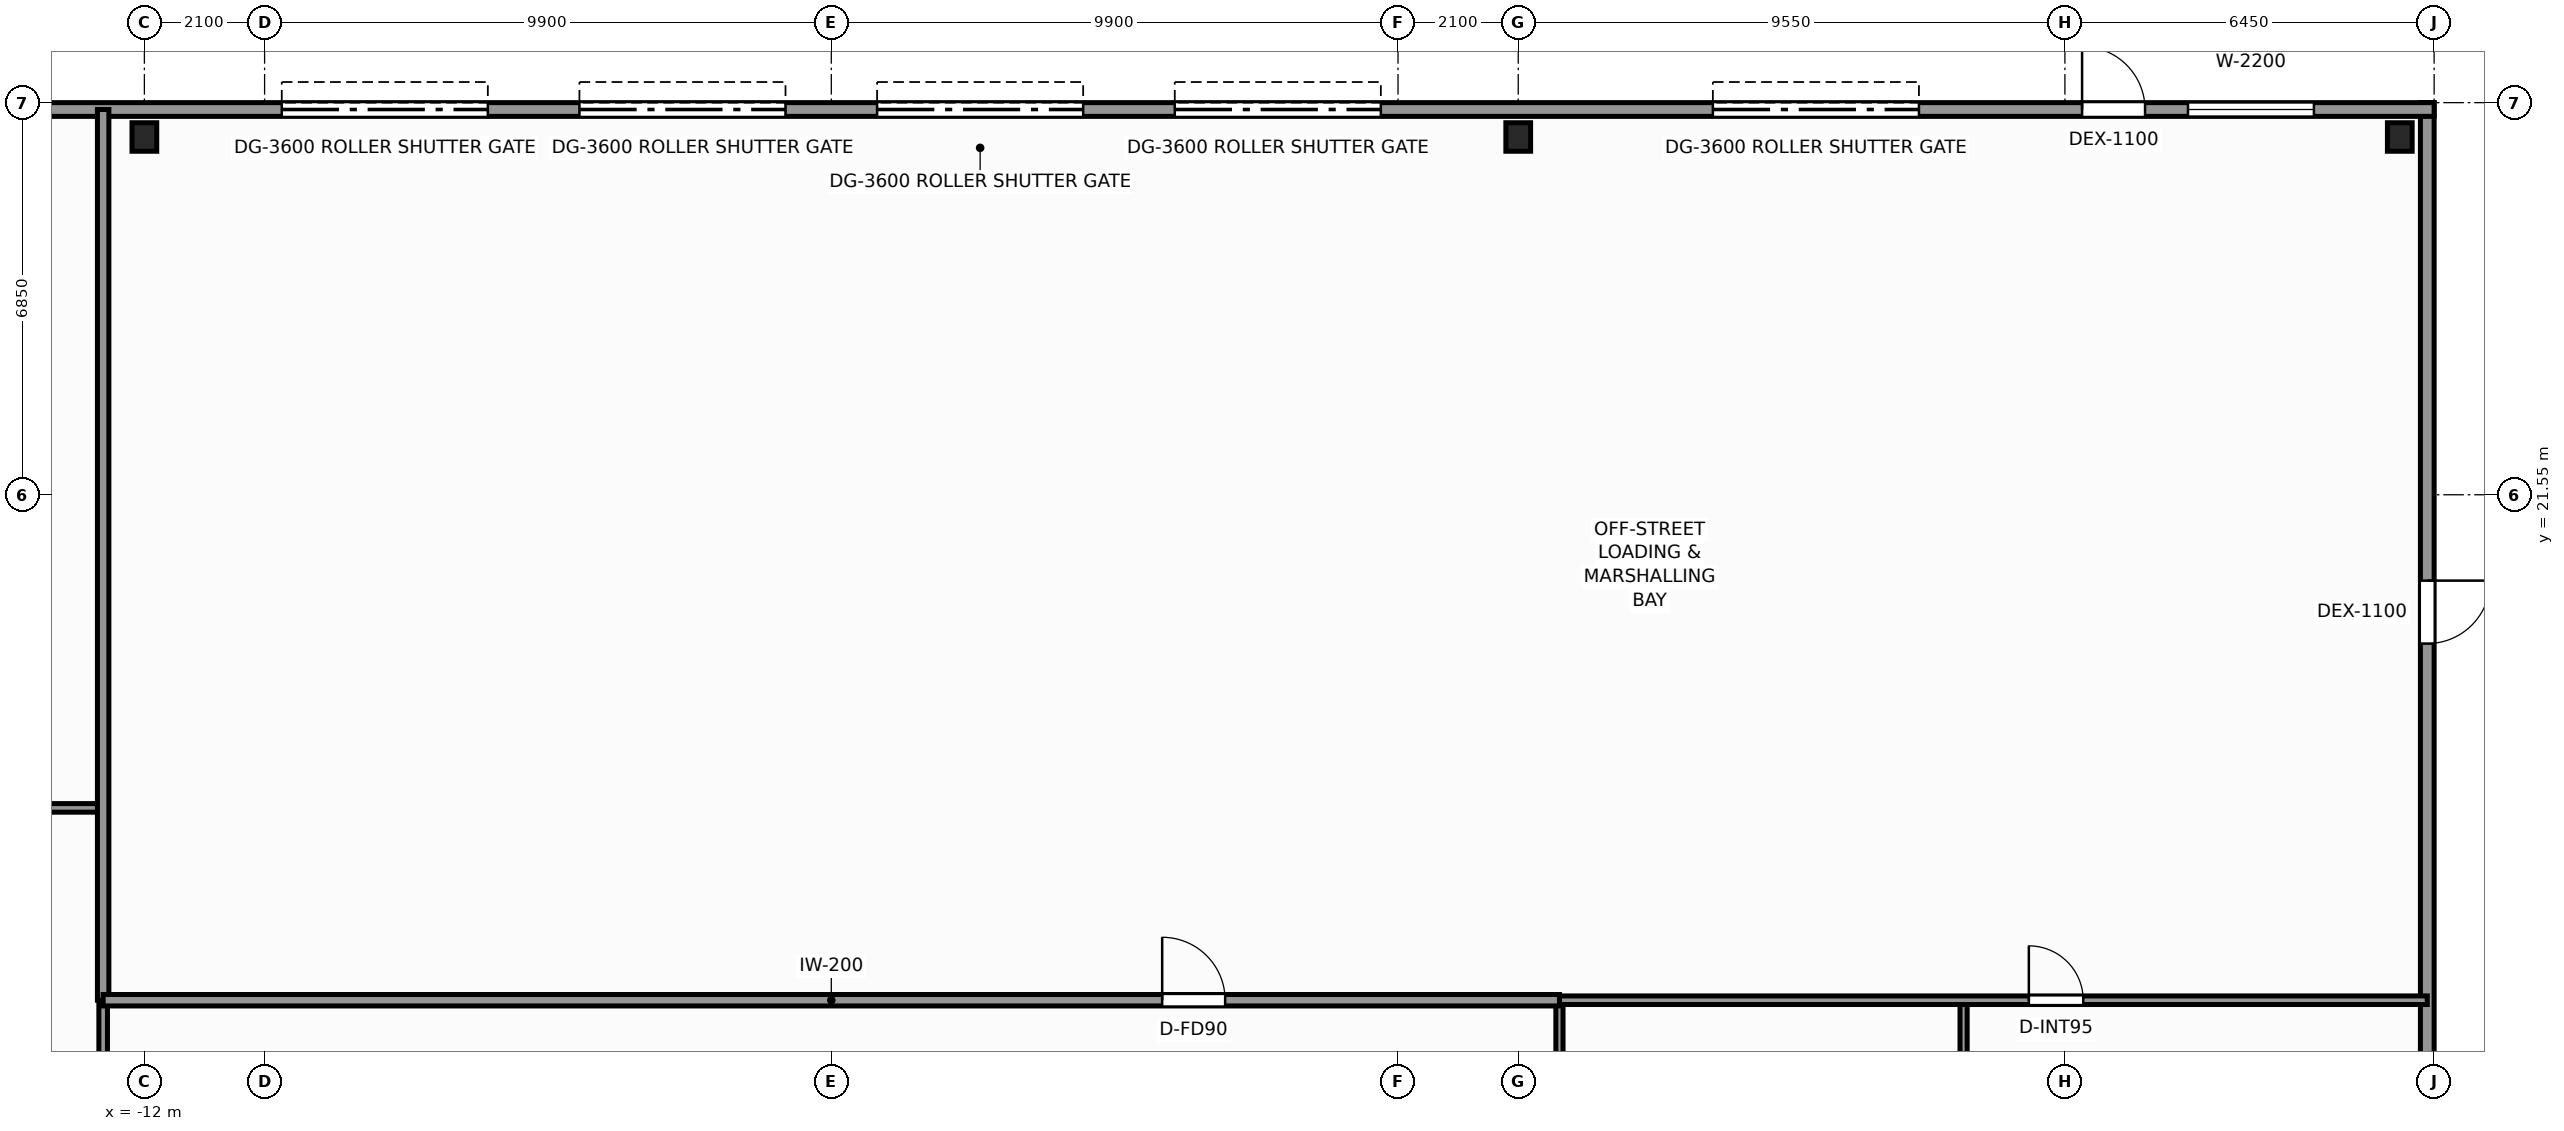
"""IFC4 building model, lengths in metres.
Left out: names, types, materials, properties, quantities, classifications, styles, units other than length and angle.
Written with IfcOpenShell. Run it as: python <this file> out.ifc"""

import sys

from ifc_helpers import new_model, si_unit, direction, frame, frame_2d, origin, origin_2d, place, context, subcontext, project, spatial, rectangle, i_section, extrude, element, fill, save


model = new_model("IFC4")
c1 = context("Model", 3, precision=1e-05, world=origin(), true_north=direction((0.0, 1.0)))
c2 = subcontext(c1, "Body", "Model", "MODEL_VIEW")
j1 = project(units=[si_unit("LENGTHUNIT", "METRE"), si_unit("PLANEANGLEUNIT", "RADIAN")], contexts=[c1])
p1 = place(None, origin())
s1 = spatial("IfcSite", under=j1, at=p1, CompositionType="ELEMENT")
p2 = place(p1, origin())
s2 = spatial("IfcBuilding", under=s1, at=p2, CompositionType="ELEMENT")
p3 = place(p2, origin())
s3 = spatial("IfcBuildingStorey", under=s2, at=p3, CompositionType="ELEMENT", Elevation=0.0)
for number, where, z_axis, x_axis in (
    (1, (-12.0, 27.8, 0.0), (0.0, 0.0, 1.0), (1.0, 0.0, 0.0)),
    (2, (12.0, 27.8, 0.0), (0.0, 0.0, 1.0), (1.0, 0.0, 0.0)),
    (3, (27.4, 27.8, 0.0), (0.0, 0.0, 1.0), (1.0, 0.0, 0.0)),
):
    element("IfcColumn", number, at=place(p3, frame(where, z_axis=z_axis, x_axis=x_axis)), inside=s3, PredefinedType="COLUMN", context=c2, shape_type="SweptSolid", body=[
        extrude(i_section(OverallWidth=0.432, OverallDepth=0.498, WebThickness=0.056, FlangeThickness=0.089, FilletRadius=0.025, at=origin_2d()), origin(), (0.0, 0.0, 1.0), 5.5),
    ])
p4 = place(p3, frame((27.88, 28.4, 0.0), z_axis=(0.0, 0.0, 1.0), x_axis=(0.0, -1.0, 0.0)))
e4 = element("IfcWall", 4, at=p4, inside=s3, PredefinedType="STANDARD", context=c2, shape_type="SweptSolid", body=[
    extrude(rectangle(XDim=56.8, YDim=0.24, at=frame_2d((28.4, 0.0))), origin(), (0.0, 0.0, 1.0), 4.748),
])
p5 = place(p4, frame((28.85, 0.0, 0.0)))
e5 = element("IfcOpeningElement", 5, at=p5, cuts=e4, PredefinedType="OPENING", context=c2, shape_type="SweptSolid", body=[
    extrude(rectangle(XDim=1.1, YDim=2.2, at=frame_2d((0.55, 1.1))), frame((0.0, 0.13, 0.0), z_axis=(0.0, -1.0, 0.0), x_axis=(1.0, 0.0, 0.0)), (0.0, 0.0, 1.0), 0.26),
])
p6 = place(p4, frame((8.35, 0.0, 0.0)))
e6 = element("IfcOpeningElement", 6, at=p6, cuts=e4, PredefinedType="OPENING", context=c2, shape_type="SweptSolid", body=[
    extrude(rectangle(XDim=1.1, YDim=2.2, at=frame_2d((0.55, 1.1))), frame((0.0, 0.13, 0.0), z_axis=(0.0, -1.0, 0.0), x_axis=(1.0, 0.0, 0.0)), (0.0, 0.0, 1.0), 0.26),
])
p7 = place(p4, frame((33.3, 0.0, 0.75)))
e7 = element("IfcOpeningElement", 7, at=p7, cuts=e4, PredefinedType="OPENING", context=c2, shape_type="SweptSolid", body=[
    extrude(rectangle(XDim=1.8, YDim=2.4, at=frame_2d((0.9, 1.2))), frame((0.0, 0.13, 0.0), z_axis=(0.0, -1.0, 0.0), x_axis=(1.0, 0.0, 0.0)), (0.0, 0.0, 1.0), 0.26),
])
p8 = place(p4, frame((44.0, 0.0, 0.75)))
e8 = element("IfcOpeningElement", 8, at=p8, cuts=e4, PredefinedType="OPENING", context=c2, shape_type="SweptSolid", body=[
    extrude(rectangle(XDim=1.8, YDim=2.4, at=frame_2d((0.9, 1.2))), frame((0.0, 0.13, 0.0), z_axis=(0.0, -1.0, 0.0), x_axis=(1.0, 0.0, 0.0)), (0.0, 0.0, 1.0), 0.26),
])
p9 = place(p4, frame((49.0, 0.0, 0.75)))
e9 = element("IfcOpeningElement", 9, at=p9, cuts=e4, PredefinedType="OPENING", context=c2, shape_type="SweptSolid", body=[
    extrude(rectangle(XDim=1.8, YDim=2.4, at=frame_2d((0.9, 1.2))), frame((0.0, 0.13, 0.0), z_axis=(0.0, -1.0, 0.0), x_axis=(1.0, 0.0, 0.0)), (0.0, 0.0, 1.0), 0.26),
])
p10 = place(p3, frame((-28.0, 28.28, 0.0), z_axis=(0.0, 0.0, 1.0), x_axis=(1.0, 0.0, 0.0)))
e10 = element("IfcWall", 10, at=p10, inside=s3, PredefinedType="STANDARD", context=c2, shape_type="SweptSolid", body=[
    extrude(rectangle(XDim=56.0, YDim=0.24, at=frame_2d((28.0, 0.0))), origin(), (0.0, 0.0, 1.0), 5.22),
])
p11 = place(p10, frame((18.4, 0.0, 0.0)))
e11 = element("IfcOpeningElement", 11, at=p11, cuts=e10, PredefinedType="OPENING", context=c2, shape_type="SweptSolid", body=[
    extrude(rectangle(XDim=3.6, YDim=3.8, at=frame_2d((1.8, 1.9))), frame((0.0, 0.13, 0.0), z_axis=(0.0, -1.0, 0.0), x_axis=(1.0, 0.0, 0.0)), (0.0, 0.0, 1.0), 0.26),
])
p12 = place(p10, frame((23.6, 0.0, 0.0)))
e12 = element("IfcOpeningElement", 12, at=p12, cuts=e10, PredefinedType="OPENING", context=c2, shape_type="SweptSolid", body=[
    extrude(rectangle(XDim=3.6, YDim=3.8, at=frame_2d((1.8, 1.9))), frame((0.0, 0.13, 0.0), z_axis=(0.0, -1.0, 0.0), x_axis=(1.0, 0.0, 0.0)), (0.0, 0.0, 1.0), 0.26),
])
p13 = place(p10, frame((28.8, 0.0, 0.0)))
e13 = element("IfcOpeningElement", 13, at=p13, cuts=e10, PredefinedType="OPENING", context=c2, shape_type="SweptSolid", body=[
    extrude(rectangle(XDim=3.6, YDim=3.8, at=frame_2d((1.8, 1.9))), frame((0.0, 0.13, 0.0), z_axis=(0.0, -1.0, 0.0), x_axis=(1.0, 0.0, 0.0)), (0.0, 0.0, 1.0), 0.26),
])
p14 = place(p10, frame((34.0, 0.0, 0.0)))
e14 = element("IfcOpeningElement", 14, at=p14, cuts=e10, PredefinedType="OPENING", context=c2, shape_type="SweptSolid", body=[
    extrude(rectangle(XDim=3.6, YDim=3.8, at=frame_2d((1.8, 1.9))), frame((0.0, 0.13, 0.0), z_axis=(0.0, -1.0, 0.0), x_axis=(1.0, 0.0, 0.0)), (0.0, 0.0, 1.0), 0.26),
])
p15 = place(p10, frame((43.4, 0.0, 0.0)))
e15 = element("IfcOpeningElement", 15, at=p15, cuts=e10, PredefinedType="OPENING", context=c2, shape_type="SweptSolid", body=[
    extrude(rectangle(XDim=3.6, YDim=3.8, at=frame_2d((1.8, 1.9))), frame((0.0, 0.13, 0.0), z_axis=(0.0, -1.0, 0.0), x_axis=(1.0, 0.0, 0.0)), (0.0, 0.0, 1.0), 0.26),
])
p16 = place(p10, frame((9.95, 0.0, 0.0)))
e16 = element("IfcOpeningElement", 16, at=p16, cuts=e10, PredefinedType="OPENING", context=c2, shape_type="SweptSolid", body=[
    extrude(rectangle(XDim=1.1, YDim=2.2, at=frame_2d((0.55, 1.1))), frame((0.0, 0.13, 0.0), z_axis=(0.0, -1.0, 0.0), x_axis=(1.0, 0.0, 0.0)), (0.0, 0.0, 1.0), 0.26),
])
p17 = place(p10, frame((49.85, 0.0, 0.0)))
e17 = element("IfcOpeningElement", 17, at=p17, cuts=e10, PredefinedType="OPENING", context=c2, shape_type="SweptSolid", body=[
    extrude(rectangle(XDim=1.1, YDim=2.2, at=frame_2d((0.55, 1.1))), frame((0.0, 0.13, 0.0), z_axis=(0.0, -1.0, 0.0), x_axis=(1.0, 0.0, 0.0)), (0.0, 0.0, 1.0), 0.26),
])
p18 = place(p10, frame((3.7, 0.0, 1.1)))
e18 = element("IfcOpeningElement", 18, at=p18, cuts=e10, PredefinedType="OPENING", context=c2, shape_type="SweptSolid", body=[
    extrude(rectangle(XDim=2.2, YDim=2.8, at=frame_2d((1.1, 1.4))), frame((0.0, 0.13, 0.0), z_axis=(0.0, -1.0, 0.0), x_axis=(1.0, 0.0, 0.0)), (0.0, 0.0, 1.0), 0.26),
])
p19 = place(p10, frame((51.7, 0.0, 1.1)))
e19 = element("IfcOpeningElement", 19, at=p19, cuts=e10, PredefinedType="OPENING", context=c2, shape_type="SweptSolid", body=[
    extrude(rectangle(XDim=2.2, YDim=2.8, at=frame_2d((1.1, 1.4))), frame((0.0, 0.13, 0.0), z_axis=(0.0, -1.0, 0.0), x_axis=(1.0, 0.0, 0.0)), (0.0, 0.0, 1.0), 0.26),
])
p20 = place(p3, frame((-12.72, 1.72, 0.0), z_axis=(0.0, 0.0, 1.0), x_axis=(0.0, 1.0, 0.0)))
e20 = element("IfcWall", 20, at=p20, inside=s3, PredefinedType="PARTITIONING", context=c2, shape_type="SweptSolid", body=[
    extrude(rectangle(XDim=11.0, YDim=0.15, at=frame_2d((5.5, 0.0))), origin(), (0.0, 0.0, 1.0), 4.278),
])
p21 = place(p20, frame((3.2, 0.0, 0.0)))
e21 = element("IfcOpeningElement", 21, at=p21, cuts=e20, PredefinedType="OPENING", context=c2, shape_type="SweptSolid", body=[
    extrude(rectangle(XDim=0.95, YDim=2.06, at=frame_2d((0.475, 1.03))), frame((0.0, 0.085, 0.0), z_axis=(0.0, -1.0, 0.0), x_axis=(1.0, 0.0, 0.0)), (0.0, 0.0, 1.0), 0.17),
])
p22 = place(p3, frame((-27.88, 16.08, 0.0), z_axis=(0.0, 0.0, 1.0), x_axis=(1.0, 0.0, 0.0)))
e22 = element("IfcWall", 22, at=p22, inside=s3, PredefinedType="PARTITIONING", context=c2, shape_type="SweptSolid", body=[
    extrude(rectangle(XDim=15.16, YDim=0.15, at=frame_2d((7.58, 0.0))), origin(), (0.0, 0.0, 1.0), 4.589),
])
p23 = place(p22, frame((11.5, 0.0, 0.0)))
e23 = element("IfcOpeningElement", 23, at=p23, cuts=e22, PredefinedType="OPENING", context=c2, shape_type="SweptSolid", body=[
    extrude(rectangle(XDim=0.95, YDim=2.06, at=frame_2d((0.475, 1.03))), frame((0.0, 0.085, 0.0), z_axis=(0.0, -1.0, 0.0), x_axis=(1.0, 0.0, 0.0)), (0.0, 0.0, 1.0), 0.17),
])
p24 = place(p3, frame((12.72, 1.72, 0.0), z_axis=(0.0, 0.0, 1.0), x_axis=(0.0, 1.0, 0.0)))
e24 = element("IfcWall", 24, at=p24, inside=s3, PredefinedType="PARTITIONING", context=c2, shape_type="SweptSolid", body=[
    extrude(rectangle(XDim=11.0, YDim=0.125, at=frame_2d((5.5, 0.0))), origin(), (0.0, 0.0, 1.0), 4.278),
])
p25 = place(p24, frame((1.15, 0.0, 0.0)))
e25 = element("IfcOpeningElement", 25, at=p25, cuts=e24, PredefinedType="OPENING", context=c2, shape_type="SweptSolid", body=[
    extrude(rectangle(XDim=0.95, YDim=2.06, at=frame_2d((0.475, 1.03))), frame((0.0, 0.073, 0.0), z_axis=(0.0, -1.0, 0.0), x_axis=(1.0, 0.0, 0.0)), (0.0, 0.0, 1.0), 0.145),
])
p26 = place(p24, frame((4.8, 0.0, 0.0)))
e26 = element("IfcOpeningElement", 26, at=p26, cuts=e24, PredefinedType="OPENING", context=c2, shape_type="SweptSolid", body=[
    extrude(rectangle(XDim=0.95, YDim=2.06, at=frame_2d((0.475, 1.03))), frame((0.0, 0.073, 0.0), z_axis=(0.0, -1.0, 0.0), x_axis=(1.0, 0.0, 0.0)), (0.0, 0.0, 1.0), 0.145),
])
p27 = place(p24, frame((8.9, 0.0, 0.0)))
e27 = element("IfcOpeningElement", 27, at=p27, cuts=e24, PredefinedType="OPENING", context=c2, shape_type="SweptSolid", body=[
    extrude(rectangle(XDim=0.95, YDim=2.06, at=frame_2d((0.475, 1.03))), frame((0.0, 0.073, 0.0), z_axis=(0.0, -1.0, 0.0), x_axis=(1.0, 0.0, 0.0)), (0.0, 0.0, 1.0), 0.145),
])
p28 = place(p3, frame((19.78, 1.72, 0.0), z_axis=(0.0, 0.0, 1.0), x_axis=(0.0, 1.0, 0.0)))
e28 = element("IfcWall", 28, at=p28, inside=s3, PredefinedType="PARTITIONING", context=c2, shape_type="SweptSolid", body=[
    extrude(rectangle(XDim=11.0, YDim=0.125, at=frame_2d((5.5, 0.0))), origin(), (0.0, 0.0, 1.0), 4.278),
])
p29 = place(p3, frame((12.72, 12.72, 0.0), z_axis=(0.0, 0.0, 1.0), x_axis=(1.0, 0.0, 0.0)))
e29 = element("IfcWall", 29, at=p29, inside=s3, PredefinedType="PARTITIONING", context=c2, shape_type="SweptSolid", body=[
    extrude(rectangle(XDim=15.16, YDim=0.15, at=frame_2d((7.58, 0.0))), origin(), (0.0, 0.0, 1.0), 4.589),
])
p30 = place(p29, frame((8.2, 0.0, 0.0)))
e30 = element("IfcOpeningElement", 30, at=p30, cuts=e29, PredefinedType="OPENING", context=c2, shape_type="SweptSolid", body=[
    extrude(rectangle(XDim=0.95, YDim=2.06, at=frame_2d((0.475, 1.03))), frame((0.0, 0.085, 0.0), z_axis=(0.0, -1.0, 0.0), x_axis=(1.0, 0.0, 0.0)), (0.0, 0.0, 1.0), 0.17),
])
p31 = place(p3, frame((-12.72, 12.72, 0.0), z_axis=(0.0, 0.0, 1.0), x_axis=(0.0, 1.0, 0.0)))
e31 = element("IfcWall", 31, at=p31, inside=s3, PredefinedType="SOLIDWALL", context=c2, shape_type="SweptSolid", body=[
    extrude(rectangle(XDim=15.56, YDim=0.2, at=frame_2d((7.78, 0.0))), origin(), (0.0, 0.0, 1.0), 4.589),
])
p32 = place(p3, frame((-12.72, 12.72, 0.0), z_axis=(0.0, 0.0, 1.0), x_axis=(1.0, 0.0, 0.0)))
e32 = element("IfcWall", 32, at=p32, inside=s3, PredefinedType="SOLIDWALL", context=c2, shape_type="SweptSolid", body=[
    extrude(rectangle(XDim=25.44, YDim=0.2, at=frame_2d((12.72, 0.0))), origin(), (0.0, 0.0, 1.0), 4.278),
])
p33 = place(p32, frame((18.5, 0.0, 0.0)))
e33 = element("IfcOpeningElement", 33, at=p33, cuts=e32, PredefinedType="OPENING", context=c2, shape_type="SweptSolid", body=[
    extrude(rectangle(XDim=1.1, YDim=2.2, at=frame_2d((0.55, 1.1))), frame((0.0, 0.11, 0.0), z_axis=(0.0, -1.0, 0.0), x_axis=(1.0, 0.0, 0.0)), (0.0, 0.0, 1.0), 0.22),
])
p34 = place(p6, origin())
e34 = element("IfcDoor", 34, at=p34, inside=s3, OperationType="SINGLE_SWING_LEFT", PredefinedType="DOOR", context=c2, shape_type="SweptSolid", body=[
    extrude(rectangle(XDim=1.1, YDim=2.2, at=frame_2d((0.55, 1.1))), frame((0.0, 0.025, 0.0), z_axis=(0.0, -1.0, 0.0), x_axis=(1.0, 0.0, 0.0)), (0.0, 0.0, 1.0), 0.05),
])
fill(e6, e34)
p35 = place(p11, origin())
e35 = element("IfcDoor", 35, at=p35, inside=s3, OperationType="ROLLINGUP", PredefinedType="GATE", context=c2, shape_type="SweptSolid", body=[
    extrude(rectangle(XDim=3.6, YDim=3.8, at=frame_2d((1.8, 1.9))), frame((0.0, 0.025, 0.0), z_axis=(0.0, -1.0, 0.0), x_axis=(1.0, 0.0, 0.0)), (0.0, 0.0, 1.0), 0.05),
])
fill(e11, e35)
p36 = place(p12, origin())
e36 = element("IfcDoor", 36, at=p36, inside=s3, OperationType="ROLLINGUP", PredefinedType="GATE", context=c2, shape_type="SweptSolid", body=[
    extrude(rectangle(XDim=3.6, YDim=3.8, at=frame_2d((1.8, 1.9))), frame((0.0, 0.025, 0.0), z_axis=(0.0, -1.0, 0.0), x_axis=(1.0, 0.0, 0.0)), (0.0, 0.0, 1.0), 0.05),
])
fill(e12, e36)
p37 = place(p13, origin())
e37 = element("IfcDoor", 37, at=p37, inside=s3, OperationType="ROLLINGUP", PredefinedType="GATE", context=c2, shape_type="SweptSolid", body=[
    extrude(rectangle(XDim=3.6, YDim=3.8, at=frame_2d((1.8, 1.9))), frame((0.0, 0.025, 0.0), z_axis=(0.0, -1.0, 0.0), x_axis=(1.0, 0.0, 0.0)), (0.0, 0.0, 1.0), 0.05),
])
fill(e13, e37)
p38 = place(p14, origin())
e38 = element("IfcDoor", 38, at=p38, inside=s3, OperationType="ROLLINGUP", PredefinedType="GATE", context=c2, shape_type="SweptSolid", body=[
    extrude(rectangle(XDim=3.6, YDim=3.8, at=frame_2d((1.8, 1.9))), frame((0.0, 0.025, 0.0), z_axis=(0.0, -1.0, 0.0), x_axis=(1.0, 0.0, 0.0)), (0.0, 0.0, 1.0), 0.05),
])
fill(e14, e38)
p39 = place(p15, origin())
e39 = element("IfcDoor", 39, at=p39, inside=s3, OperationType="ROLLINGUP", PredefinedType="GATE", context=c2, shape_type="SweptSolid", body=[
    extrude(rectangle(XDim=3.6, YDim=3.8, at=frame_2d((1.8, 1.9))), frame((0.0, 0.025, 0.0), z_axis=(0.0, -1.0, 0.0), x_axis=(1.0, 0.0, 0.0)), (0.0, 0.0, 1.0), 0.05),
])
fill(e15, e39)
p40 = place(p17, origin())
e40 = element("IfcDoor", 40, at=p40, inside=s3, OperationType="SINGLE_SWING_LEFT", PredefinedType="DOOR", context=c2, shape_type="SweptSolid", body=[
    extrude(rectangle(XDim=1.1, YDim=2.2, at=frame_2d((0.55, 1.1))), frame((0.0, 0.025, 0.0), z_axis=(0.0, -1.0, 0.0), x_axis=(1.0, 0.0, 0.0)), (0.0, 0.0, 1.0), 0.05),
])
fill(e17, e40)
p41 = place(p19, origin())
e41 = element("IfcWindow", 41, at=p41, inside=s3, PartitioningType="SINGLE_PANEL", PredefinedType="WINDOW", context=c2, shape_type="SweptSolid", body=[
    extrude(rectangle(XDim=2.2, YDim=2.8, at=frame_2d((1.1, 1.4))), frame((0.0, 0.03, 0.0), z_axis=(0.0, -1.0, 0.0), x_axis=(1.0, 0.0, 0.0)), (0.0, 0.0, 1.0), 0.06),
])
fill(e19, e41)
p42 = place(p30, origin())
e42 = element("IfcDoor", 42, at=p42, inside=s3, OperationType="SINGLE_SWING_LEFT", PredefinedType="DOOR", context=c2, shape_type="SweptSolid", body=[
    extrude(rectangle(XDim=0.95, YDim=2.06, at=frame_2d((0.475, 1.03))), frame((0.0, 0.025, 0.0), z_axis=(0.0, -1.0, 0.0), x_axis=(1.0, 0.0, 0.0)), (0.0, 0.0, 1.0), 0.05),
])
fill(e30, e42)
p43 = place(p33, origin())
e43 = element("IfcDoor", 43, at=p43, inside=s3, OperationType="SINGLE_SWING_LEFT", PredefinedType="DOOR", context=c2, shape_type="SweptSolid", body=[
    extrude(rectangle(XDim=1.1, YDim=2.2, at=frame_2d((0.55, 1.1))), frame((0.0, 0.025, 0.0), z_axis=(0.0, -1.0, 0.0), x_axis=(1.0, 0.0, 0.0)), (0.0, 0.0, 1.0), 0.05),
])
fill(e33, e43)
save(model, sys.argv[1])
